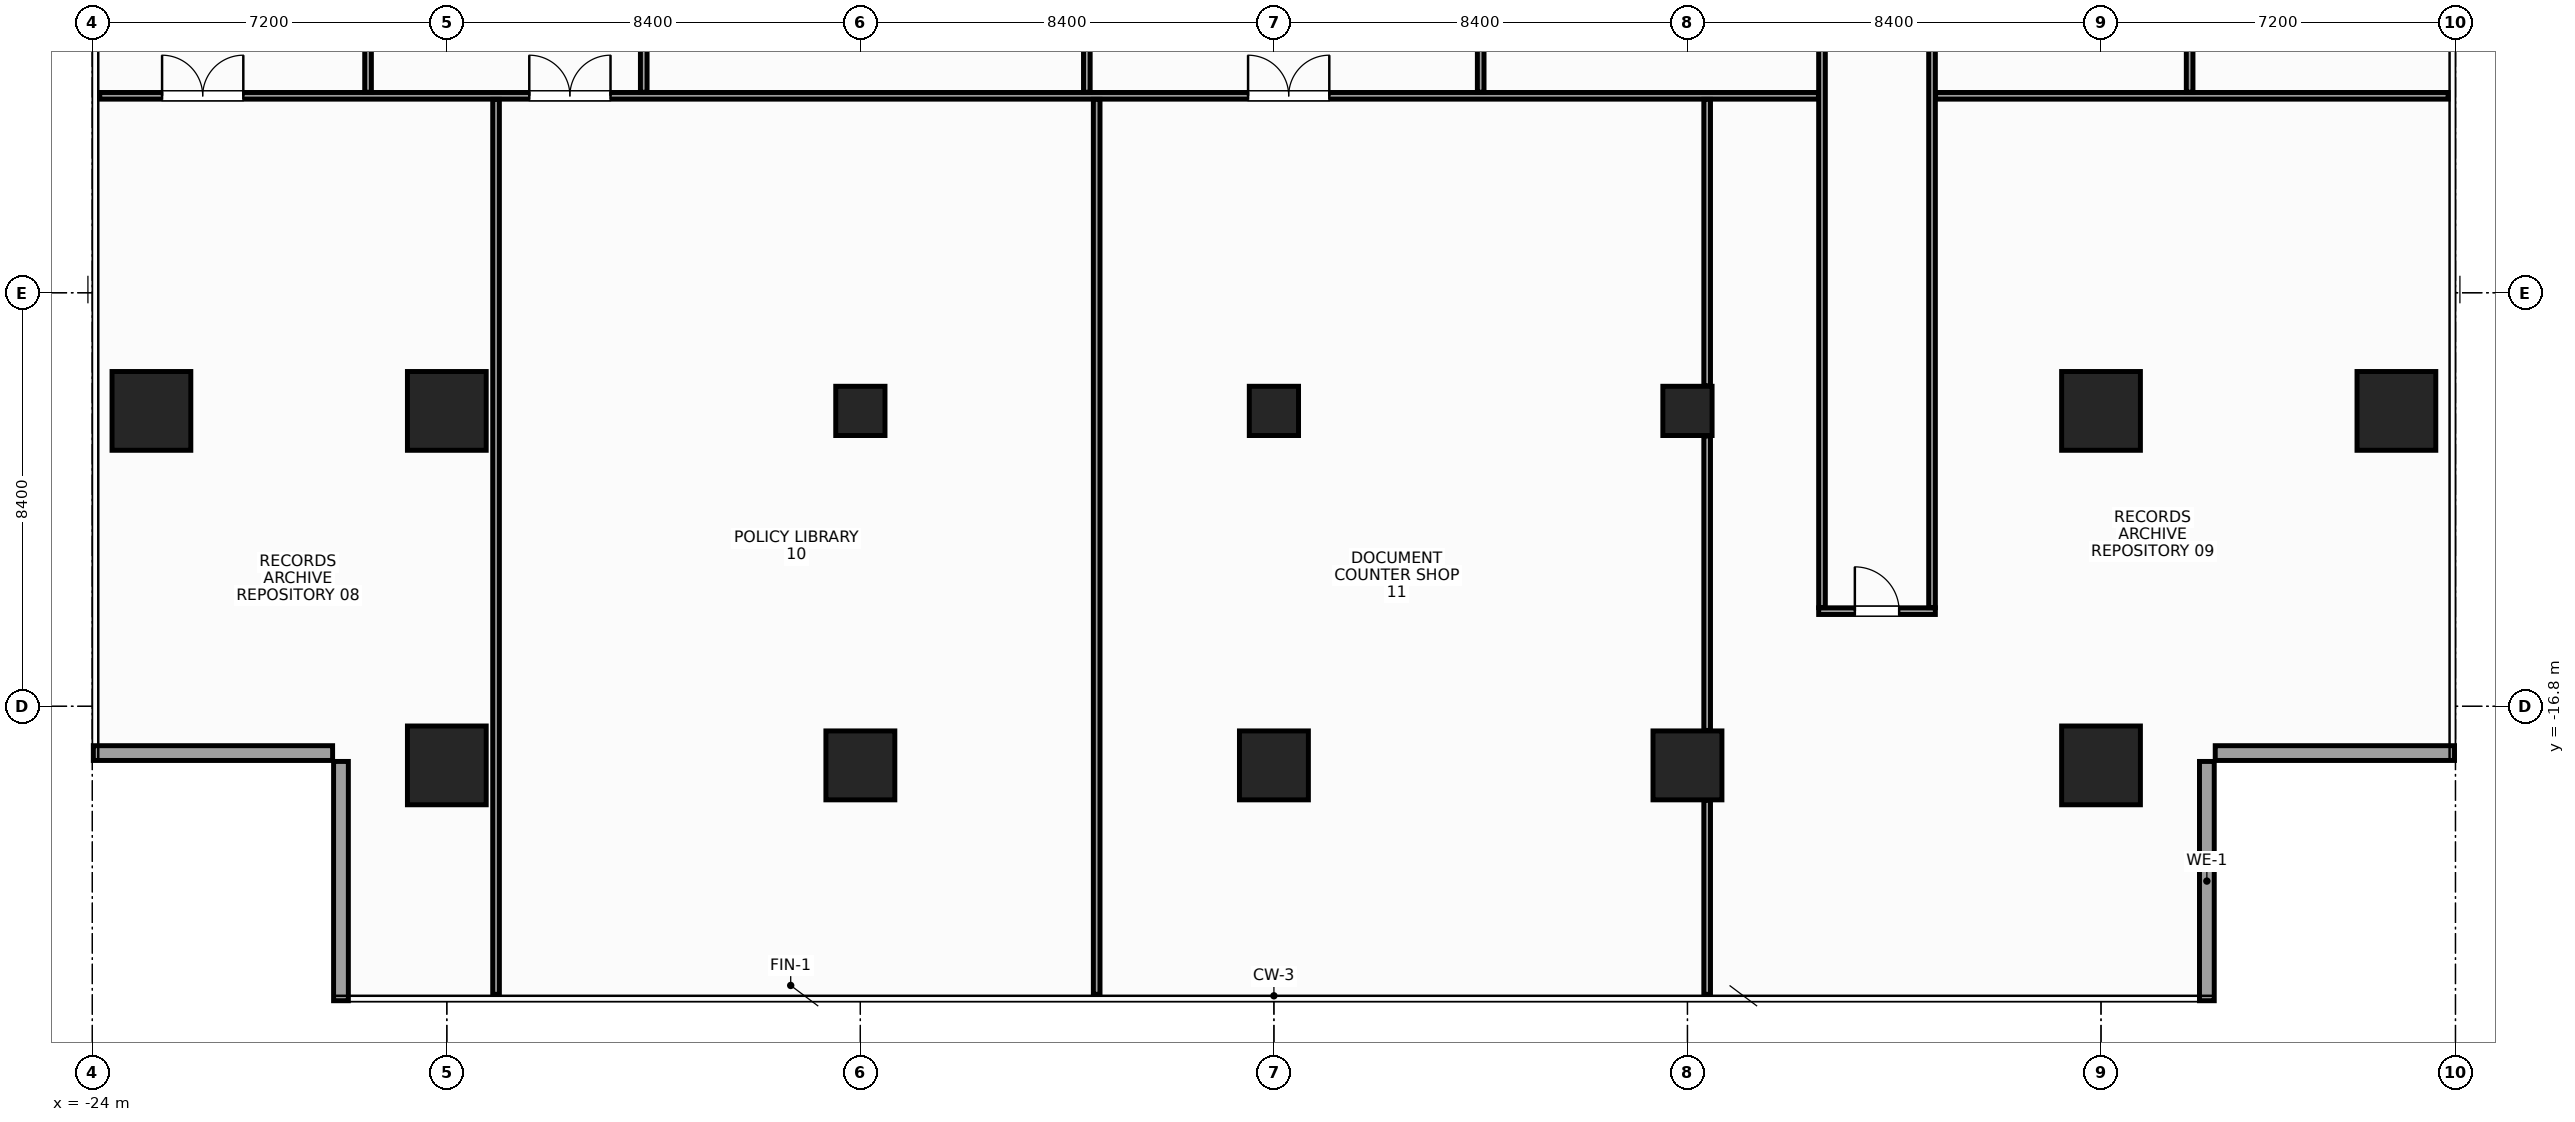
"""IFC4 building model, lengths in metres.
Left out: names, types, materials, properties, quantities, classifications, styles, units other than length and angle.
Written with IfcOpenShell. Run it as: python <this file> out.ifc"""

import sys

from ifc_helpers import new_model, si_unit, direction, frame, frame_2d, origin, origin_2d, place, context, subcontext, project, spatial, rectangle, hollow_rectangle, extrude, source, transform, mapped, element, fill, save


model = new_model("IFC4")
c1 = context("Model", 3, precision=1e-05, world=origin(), true_north=direction((0.0, 1.0)))
c2 = subcontext(c1, "Body", "Model", "MODEL_VIEW")
j1 = project(units=[si_unit("LENGTHUNIT", "METRE"), si_unit("PLANEANGLEUNIT", "RADIAN")], contexts=[c1])
p1 = place(None, origin())
s1 = spatial("IfcSite", under=j1, at=p1, CompositionType="ELEMENT")
p2 = place(p1, origin())
s2 = spatial("IfcBuilding", under=s1, at=p2, CompositionType="ELEMENT")
p3 = place(p2, frame((0.0, 0.0, 131.6)))
s3 = spatial("IfcBuildingStorey", under=s2, at=p3, CompositionType="ELEMENT", Elevation=131.6)
m1 = source(origin(), c2, "Body", "SweptSolid", [
    extrude(rectangle(XDim=1.6, YDim=1.6, at=origin_2d()), origin(), (0.0, 0.0, 1.0), 3.6),
])
for number, where, z_axis, x_axis in (
    (1, (-16.8, -18.0, 0.0), (0.0, 0.0, 1.0), (1.0, 0.0, 0.0)),
    (2, (-16.8, -10.8, 0.0), (0.0, 0.0, 1.0), (1.0, 0.0, 0.0)),
    (3, (16.8, -18.0, 0.0), (0.0, 0.0, 1.0), (1.0, 0.0, 0.0)),
    (4, (16.8, -10.8, 0.0), (0.0, 0.0, 1.0), (1.0, 0.0, 0.0)),
    (5, (-22.8, -10.8, 0.0), (0.0, 0.0, 1.0), (1.0, 0.0, 0.0)),
    (6, (22.8, -10.8, 0.0), (0.0, 0.0, 1.0), (1.0, 0.0, 0.0)),
):
    element("IfcColumn", number, at=place(p3, frame(where, z_axis=z_axis, x_axis=x_axis)), inside=s3, PredefinedType="COLUMN", context=c2, shape_type="MappedRepresentation", body=[
        mapped(m1, transform((0.0, 0.0, 0.0), x_axis=(1.0, 0.0, 0.0), y_axis=(0.0, 1.0, 0.0), z_axis=(0.0, 0.0, 1.0), scale=1.0)),
    ])
m2 = source(origin(), c2, "Body", "SweptSolid", [
    extrude(rectangle(XDim=1.4, YDim=1.4, at=origin_2d()), origin(), (0.0, 0.0, 1.0), 3.6),
])
p4 = place(p3, frame((-8.4, -18.0, 0.0), z_axis=(0.0, 0.0, 1.0), x_axis=(1.0, 0.0, 0.0)))
e7 = element("IfcColumn", 7, at=p4, inside=s3, PredefinedType="COLUMN", context=c2, shape_type="MappedRepresentation", body=[
    mapped(m2, transform((0.0, 0.0, 0.0), x_axis=(1.0, 0.0, 0.0), y_axis=(0.0, 1.0, 0.0), z_axis=(0.0, 0.0, 1.0), scale=1.0)),
])
m3 = source(origin(), c2, "Body", "SweptSolid", [
    extrude(hollow_rectangle(XDim=1.0, YDim=1.0, WallThickness=0.045, at=origin_2d()), origin(), (0.0, 0.0, 1.0), 3.6),
])
p5 = place(p3, frame((-8.4, -10.8, 0.0), z_axis=(0.0, 0.0, 1.0), x_axis=(1.0, 0.0, 0.0)))
e8 = element("IfcColumn", 8, at=p5, inside=s3, PredefinedType="COLUMN", context=c2, shape_type="MappedRepresentation", body=[
    mapped(m3, transform((0.0, 0.0, 0.0), x_axis=(1.0, 0.0, 0.0), y_axis=(0.0, 1.0, 0.0), z_axis=(0.0, 0.0, 1.0), scale=1.0)),
])
p6 = place(p3, frame((8.4, -18.0, 0.0), z_axis=(0.0, 0.0, 1.0), x_axis=(1.0, 0.0, 0.0)))
e9 = element("IfcColumn", 9, at=p6, inside=s3, PredefinedType="COLUMN", context=c2, shape_type="MappedRepresentation", body=[
    mapped(m2, transform((0.0, 0.0, 0.0), x_axis=(1.0, 0.0, 0.0), y_axis=(0.0, 1.0, 0.0), z_axis=(0.0, 0.0, 1.0), scale=1.0)),
])
p7 = place(p3, frame((8.4, -10.8, 0.0), z_axis=(0.0, 0.0, 1.0), x_axis=(1.0, 0.0, 0.0)))
e10 = element("IfcColumn", 10, at=p7, inside=s3, PredefinedType="COLUMN", context=c2, shape_type="MappedRepresentation", body=[
    mapped(m3, transform((0.0, 0.0, 0.0), x_axis=(1.0, 0.0, 0.0), y_axis=(0.0, 1.0, 0.0), z_axis=(0.0, 0.0, 1.0), scale=1.0)),
])
p8 = place(p3, frame((0.0, -18.0, 0.0), z_axis=(0.0, 0.0, 1.0), x_axis=(1.0, 0.0, 0.0)))
e11 = element("IfcColumn", 11, at=p8, inside=s3, PredefinedType="COLUMN", context=c2, shape_type="MappedRepresentation", body=[
    mapped(m2, transform((0.0, 0.0, 0.0), x_axis=(1.0, 0.0, 0.0), y_axis=(0.0, 1.0, 0.0), z_axis=(0.0, 0.0, 1.0), scale=1.0)),
])
m4 = source(origin(), c2, "Body", "SweptSolid", [
    extrude(rectangle(XDim=1.0, YDim=1.0, at=origin_2d()), origin(), (0.0, 0.0, 1.0), 3.6),
])
p9 = place(p3, frame((0.0, -10.8, 0.0), z_axis=(0.0, 0.0, 1.0), x_axis=(1.0, 0.0, 0.0)))
e12 = element("IfcColumn", 12, at=p9, inside=s3, PredefinedType="COLUMN", context=c2, shape_type="MappedRepresentation", body=[
    mapped(m4, transform((0.0, 0.0, 0.0), x_axis=(1.0, 0.0, 0.0), y_axis=(0.0, 1.0, 0.0), z_axis=(0.0, 0.0, 1.0), scale=1.0)),
])
m5 = source(origin(), c2, "Body", "SweptSolid", [
    extrude(rectangle(XDim=4.86, YDim=0.3, at=frame_2d((2.43, 0.0))), origin(), (0.0, 0.0, 1.0), 2.76),
])
p10 = place(p3, frame((18.95, -22.78, 0.0), z_axis=(0.0, 0.0, 1.0), x_axis=(0.0, 1.0, 0.0)))
e13 = element("IfcWall", 13, at=p10, inside=s3, PredefinedType="STANDARD", context=c2, shape_type="MappedRepresentation", body=[
    mapped(m5, transform((0.0, 0.0, 0.0), x_axis=(1.0, 0.0, 0.0), y_axis=(0.0, 1.0, 0.0), z_axis=(0.0, 0.0, 1.0), scale=1.0)),
])
m6 = source(origin(), c2, "Body", "SweptSolid", [
    extrude(rectangle(XDim=4.86, YDim=0.3, at=frame_2d((2.43, 0.0))), origin(), (0.0, 0.0, 1.0), 2.76),
])
for number, where, z_axis, x_axis in (
    (14, (19.12, -17.75, 0.0), (0.0, 0.0, 1.0), (1.0, 0.0, 0.0)),
    (15, (-23.98, -17.75, 0.0), (0.0, 0.0, 1.0), (1.0, 0.0, 0.0)),
):
    element("IfcWall", number, at=place(p3, frame(where, z_axis=z_axis, x_axis=x_axis)), inside=s3, PredefinedType="STANDARD", context=c2, shape_type="MappedRepresentation", body=[
        mapped(m6, transform((0.0, 0.0, 0.0), x_axis=(1.0, 0.0, 0.0), y_axis=(0.0, 1.0, 0.0), z_axis=(0.0, 0.0, 1.0), scale=1.0)),
    ])
p11 = place(p3, frame((-18.95, -17.92, 0.0), z_axis=(0.0, 0.0, 1.0), x_axis=(0.0, -1.0, 0.0)))
e16 = element("IfcWall", 16, at=p11, inside=s3, PredefinedType="STANDARD", context=c2, shape_type="MappedRepresentation", body=[
    mapped(m5, transform((0.0, 0.0, 0.0), x_axis=(1.0, 0.0, 0.0), y_axis=(0.0, 1.0, 0.0), z_axis=(0.0, 0.0, 1.0), scale=1.0)),
])
m7 = source(origin(), c2, "Body", "SweptSolid", [
    extrude(rectangle(XDim=2.37, YDim=0.135, at=frame_2d((1.185, 0.0))), origin(), (0.0, 0.0, 1.0), 3.38),
])
p12 = place(p3, frame((11.065, -14.867, 0.0), z_axis=(0.0, 0.0, 1.0), x_axis=(1.0, 0.0, 0.0)))
e17 = element("IfcWall", 17, at=p12, inside=s3, PredefinedType="PARTITIONING", context=c2, shape_type="MappedRepresentation", body=[
    mapped(m7, transform((0.0, 0.0, 0.0), x_axis=(1.0, 0.0, 0.0), y_axis=(0.0, 1.0, 0.0), z_axis=(0.0, 0.0, 1.0), scale=1.0)),
])
p13 = place(p12, frame((0.735, 0.0, 0.0)))
e18 = element("IfcOpeningElement", 18, at=p13, cuts=e17, PredefinedType="OPENING", context=c2, shape_type="SweptSolid", body=[
    extrude(rectangle(XDim=0.9, YDim=2.15, at=frame_2d((0.45, 1.075))), frame((0.0, 0.08, 0.0), z_axis=(0.0, -1.0, 0.0), x_axis=(1.0, 0.0, 0.0)), (0.0, 0.0, 1.0), 0.159),
])
m8 = source(origin(), c2, "Body", "SweptSolid", [
    extrude(rectangle(XDim=22.595, YDim=0.135, at=frame_2d((11.297, 0.0))), origin(), (0.0, 0.0, 1.0), 2.665),
])
for number, where, z_axis, x_axis in (
    (19, (11.133, -14.795, 0.0), (0.0, 0.0, 1.0), (0.0, 1.0, 0.0)),
    (20, (13.367, -14.795, 0.0), (0.0, 0.0, 1.0), (0.0, 1.0, 0.0)),
):
    element("IfcWall", number, at=place(p3, frame(where, z_axis=z_axis, x_axis=x_axis)), inside=s3, PredefinedType="PARTITIONING", context=c2, shape_type="MappedRepresentation", body=[
        mapped(m8, transform((0.0, 0.0, 0.0), x_axis=(1.0, 0.0, 0.0), y_axis=(0.0, 1.0, 0.0), z_axis=(0.0, 0.0, 1.0), scale=1.0)),
    ])
m9 = source(origin(), c2, "Body", "SweptSolid", [
    extrude(rectangle(XDim=34.91, YDim=0.135, at=frame_2d((17.455, 0.0))), origin(), (0.0, 0.0, 1.0), 2.765),
])
p14 = place(p3, frame((-23.85, -4.4, 0.0), z_axis=(0.0, 0.0, 1.0), x_axis=(1.0, 0.0, 0.0)))
e21 = element("IfcWall", 21, at=p14, inside=s3, PredefinedType="PARTITIONING", context=c2, shape_type="MappedRepresentation", body=[
    mapped(m9, transform((0.0, 0.0, 0.0), x_axis=(1.0, 0.0, 0.0), y_axis=(0.0, 1.0, 0.0), z_axis=(0.0, 0.0, 1.0), scale=1.0)),
])
p15 = place(p14, frame((1.266, 0.0, 0.0)))
e22 = element("IfcOpeningElement", 22, at=p15, cuts=e21, PredefinedType="OPENING", context=c2, shape_type="SweptSolid", body=[
    extrude(rectangle(XDim=1.65, YDim=2.35, at=frame_2d((0.825, 1.175))), frame((0.0, 0.08, 0.0), z_axis=(0.0, -1.0, 0.0), x_axis=(1.0, 0.0, 0.0)), (0.0, 0.0, 1.0), 0.159),
])
p16 = place(p14, frame((8.725, 0.0, 0.0)))
e23 = element("IfcOpeningElement", 23, at=p16, cuts=e21, PredefinedType="OPENING", context=c2, shape_type="SweptSolid", body=[
    extrude(rectangle(XDim=1.65, YDim=2.35, at=frame_2d((0.825, 1.175))), frame((0.0, 0.08, 0.0), z_axis=(0.0, -1.0, 0.0), x_axis=(1.0, 0.0, 0.0)), (0.0, 0.0, 1.0), 0.159),
])
p17 = place(p14, frame((23.325, 0.0, 0.0)))
e24 = element("IfcOpeningElement", 24, at=p17, cuts=e21, PredefinedType="OPENING", context=c2, shape_type="SweptSolid", body=[
    extrude(rectangle(XDim=1.65, YDim=2.35, at=frame_2d((0.825, 1.175))), frame((0.0, 0.08, 0.0), z_axis=(0.0, -1.0, 0.0), x_axis=(1.0, 0.0, 0.0)), (0.0, 0.0, 1.0), 0.159),
])
m10 = source(origin(), c2, "Body", "SweptSolid", [
    extrude(rectangle(XDim=10.41, YDim=0.135, at=frame_2d((5.205, 0.0))), origin(), (0.0, 0.0, 1.0), 2.765),
])
p18 = place(p3, frame((13.44, -4.4, 0.0), z_axis=(0.0, 0.0, 1.0), x_axis=(1.0, 0.0, 0.0)))
e25 = element("IfcWall", 25, at=p18, inside=s3, PredefinedType="PARTITIONING", context=c2, shape_type="MappedRepresentation", body=[
    mapped(m10, transform((0.0, 0.0, 0.0), x_axis=(1.0, 0.0, 0.0), y_axis=(0.0, 1.0, 0.0), z_axis=(0.0, 0.0, 1.0), scale=1.0)),
])
m11 = source(origin(), c2, "Body", "SweptSolid", [
    extrude(rectangle(XDim=11.987, YDim=0.135, at=frame_2d((5.994, 0.0))), origin(), (0.0, 0.0, 1.0), 2.915),
])
p19 = place(p3, frame((-18.4, -4.327, 0.0), z_axis=(0.0, 0.0, 1.0), x_axis=(0.0, 1.0, 0.0)))
e26 = element("IfcWall", 26, at=p19, inside=s3, PredefinedType="PARTITIONING", context=c2, shape_type="MappedRepresentation", body=[
    mapped(m11, transform((0.0, 0.0, 0.0), x_axis=(1.0, 0.0, 0.0), y_axis=(0.0, 1.0, 0.0), z_axis=(0.0, 0.0, 1.0), scale=1.0)),
])
m12 = source(origin(), c2, "Body", "SweptSolid", [
    extrude(rectangle(XDim=11.987, YDim=0.135, at=frame_2d((5.994, 0.0))), origin(), (0.0, 0.0, 1.0), 2.665),
])
for number, where, z_axis, x_axis in (
    (27, (-12.8, -4.327, 0.0), (0.0, 0.0, 1.0), (0.0, 1.0, 0.0)),
    (28, (-3.8, -4.327, 0.0), (0.0, 0.0, 1.0), (0.0, 1.0, 0.0)),
    (29, (4.2, -4.327, 0.0), (0.0, 0.0, 1.0), (0.0, 1.0, 0.0)),
):
    element("IfcWall", number, at=place(p3, frame(where, z_axis=z_axis, x_axis=x_axis)), inside=s3, PredefinedType="PARTITIONING", context=c2, shape_type="MappedRepresentation", body=[
        mapped(m12, transform((0.0, 0.0, 0.0), x_axis=(1.0, 0.0, 0.0), y_axis=(0.0, 1.0, 0.0), z_axis=(0.0, 0.0, 1.0), scale=1.0)),
    ])
p20 = place(p3, frame((18.6, -4.327, 0.0), z_axis=(0.0, 0.0, 1.0), x_axis=(0.0, 1.0, 0.0)))
e30 = element("IfcWall", 30, at=p20, inside=s3, PredefinedType="PARTITIONING", context=c2, shape_type="MappedRepresentation", body=[
    mapped(m11, transform((0.0, 0.0, 0.0), x_axis=(1.0, 0.0, 0.0), y_axis=(0.0, 1.0, 0.0), z_axis=(0.0, 0.0, 1.0), scale=1.0)),
])
m13 = source(origin(), c2, "Body", "SweptSolid", [
    extrude(rectangle(XDim=18.177, YDim=0.135, at=frame_2d((9.089, 0.0))), origin(), (0.0, 0.0, 1.0), 2.915),
])
for number, where, z_axis, x_axis in (
    (31, (-15.8, -22.65, 0.0), (0.0, 0.0, 1.0), (0.0, 1.0, 0.0)),
    (32, (-3.6, -22.65, 0.0), (0.0, 0.0, 1.0), (0.0, 1.0, 0.0)),
):
    element("IfcWall", number, at=place(p3, frame(where, z_axis=z_axis, x_axis=x_axis)), inside=s3, PredefinedType="PARTITIONING", context=c2, shape_type="MappedRepresentation", body=[
        mapped(m13, transform((0.0, 0.0, 0.0), x_axis=(1.0, 0.0, 0.0), y_axis=(0.0, 1.0, 0.0), z_axis=(0.0, 0.0, 1.0), scale=1.0)),
    ])
m14 = source(origin(), c2, "Body", "SweptSolid", [
    extrude(rectangle(XDim=3.94, YDim=0.135, at=frame_2d((1.97, 0.0))), origin(), (0.0, 0.0, 1.0), 3.38),
])
p21 = place(p3, frame((8.8, -22.65, 0.0), z_axis=(0.0, 0.0, 1.0), x_axis=(0.0, 1.0, 0.0)))
e33 = element("IfcWall", 33, at=p21, inside=s3, PredefinedType="PARTITIONING", context=c2, shape_type="MappedRepresentation", body=[
    mapped(m14, transform((0.0, 0.0, 0.0), x_axis=(1.0, 0.0, 0.0), y_axis=(0.0, 1.0, 0.0), z_axis=(0.0, 0.0, 1.0), scale=1.0)),
])
m15 = source(origin(), c2, "Body", "SweptSolid", [
    extrude(rectangle(XDim=5.98, YDim=0.135, at=frame_2d((2.99, 0.0))), origin(), (0.0, 0.0, 1.0), 3.38),
])
p22 = place(p3, frame((8.8, -17.29, 0.0), z_axis=(0.0, 0.0, 1.0), x_axis=(0.0, 1.0, 0.0)))
e34 = element("IfcWall", 34, at=p22, inside=s3, PredefinedType="PARTITIONING", context=c2, shape_type="MappedRepresentation", body=[
    mapped(m15, transform((0.0, 0.0, 0.0), x_axis=(1.0, 0.0, 0.0), y_axis=(0.0, 1.0, 0.0), z_axis=(0.0, 0.0, 1.0), scale=1.0)),
])
m16 = source(origin(), c2, "Body", "SweptSolid", [
    extrude(rectangle(XDim=5.818, YDim=0.135, at=frame_2d((2.909, 0.0))), origin(), (0.0, 0.0, 1.0), 3.38),
])
p23 = place(p3, frame((8.8, -10.29, 0.0), z_axis=(0.0, 0.0, 1.0), x_axis=(0.0, 1.0, 0.0)))
e35 = element("IfcWall", 35, at=p23, inside=s3, PredefinedType="PARTITIONING", context=c2, shape_type="MappedRepresentation", body=[
    mapped(m16, transform((0.0, 0.0, 0.0), x_axis=(1.0, 0.0, 0.0), y_axis=(0.0, 1.0, 0.0), z_axis=(0.0, 0.0, 1.0), scale=1.0)),
])
m17 = source(origin(), c2, "Body", "SweptSolid", [
    extrude(rectangle(XDim=0.9, YDim=2.15, at=frame_2d((0.45, 1.075))), frame((0.0, 0.025, 0.0), z_axis=(0.0, -1.0, 0.0), x_axis=(1.0, 0.0, 0.0)), (0.0, 0.0, 1.0), 0.05),
])
p24 = place(p13, origin())
e36 = element("IfcDoor", 36, at=p24, inside=s3, OperationType="SINGLE_SWING_LEFT", PredefinedType="DOOR", context=c2, shape_type="MappedRepresentation", body=[
    mapped(m17, transform((0.0, 0.0, 0.0), x_axis=(1.0, 0.0, 0.0), y_axis=(0.0, 1.0, 0.0), z_axis=(0.0, 0.0, 1.0), scale=1.0)),
])
fill(e18, e36)
m18 = source(origin(), c2, "Body", "SweptSolid", [
    extrude(rectangle(XDim=1.65, YDim=2.35, at=frame_2d((0.825, 1.175))), frame((0.0, 0.025, 0.0), z_axis=(0.0, -1.0, 0.0), x_axis=(1.0, 0.0, 0.0)), (0.0, 0.0, 1.0), 0.05),
])
p25 = place(p15, origin())
e37 = element("IfcDoor", 37, at=p25, inside=s3, OperationType="DOUBLE_DOOR_SINGLE_SWING", PredefinedType="DOOR", context=c2, shape_type="MappedRepresentation", body=[
    mapped(m18, transform((0.0, 0.0, 0.0), x_axis=(1.0, 0.0, 0.0), y_axis=(0.0, 1.0, 0.0), z_axis=(0.0, 0.0, 1.0), scale=1.0)),
])
fill(e22, e37)
p26 = place(p16, origin())
e38 = element("IfcDoor", 38, at=p26, inside=s3, OperationType="DOUBLE_DOOR_SINGLE_SWING", PredefinedType="DOOR", context=c2, shape_type="MappedRepresentation", body=[
    mapped(m18, transform((0.0, 0.0, 0.0), x_axis=(1.0, 0.0, 0.0), y_axis=(0.0, 1.0, 0.0), z_axis=(0.0, 0.0, 1.0), scale=1.0)),
])
fill(e23, e38)
p27 = place(p17, origin())
e39 = element("IfcDoor", 39, at=p27, inside=s3, OperationType="DOUBLE_DOOR_SINGLE_SWING", PredefinedType="DOOR", context=c2, shape_type="MappedRepresentation", body=[
    mapped(m18, transform((0.0, 0.0, 0.0), x_axis=(1.0, 0.0, 0.0), y_axis=(0.0, 1.0, 0.0), z_axis=(0.0, 0.0, 1.0), scale=1.0)),
])
fill(e24, e39)
save(model, sys.argv[1])
